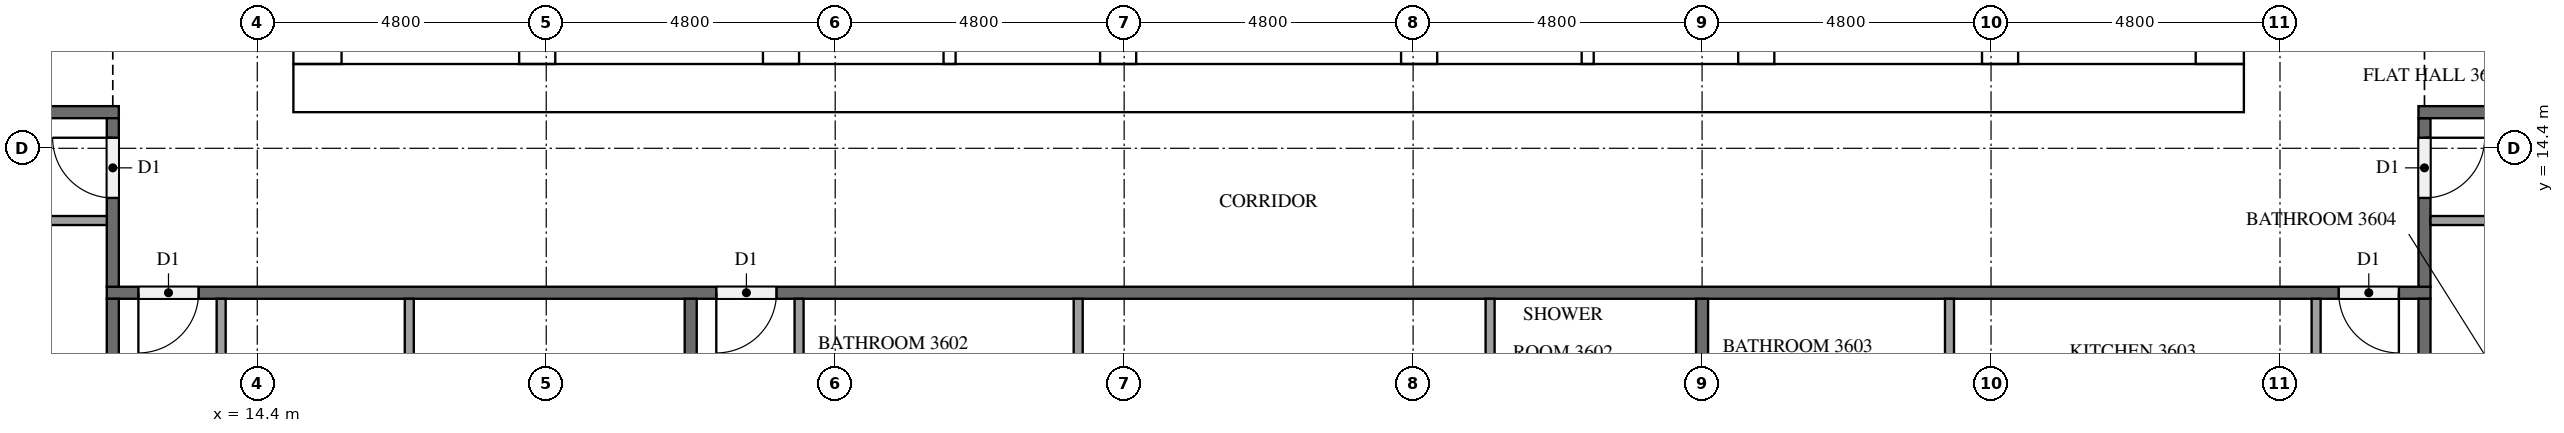
"""IFC4 building model, lengths in metres.
Left out: names, types, materials, properties, quantities, classifications, styles, units other than length and angle.
Written with IfcOpenShell. Run it as: python <this file> out.ifc"""

import sys

from ifc_helpers import new_model, si_unit, direction, frame, frame_2d, origin, place, context, subcontext, project, spatial, rectangle, extrude, element, fill, save


model = new_model("IFC4")
c1 = context("Model", 3, precision=1e-05, world=origin(), true_north=direction((0.0, 1.0)))
c2 = subcontext(c1, "Body", "Model", "MODEL_VIEW")
j1 = project(units=[si_unit("LENGTHUNIT", "METRE"), si_unit("PLANEANGLEUNIT", "RADIAN")], contexts=[c1])
p1 = place(None, origin())
s1 = spatial("IfcSite", under=j1, at=p1, CompositionType="ELEMENT")
p2 = place(p1, origin())
s2 = spatial("IfcBuilding", under=s1, at=p2, CompositionType="ELEMENT")
p3 = place(p2, frame((0.0, 0.0, 140.1)))
s3 = spatial("IfcBuildingStorey", under=s2, at=p3, CompositionType="ELEMENT", Elevation=140.1)
p4 = place(p3, frame((15.0, 15.4, 0.0), z_axis=(0.0, 0.0, 1.0), x_axis=(1.0, 0.0, 0.0)))
e1 = element("IfcWall", 1, at=p4, inside=s3, PredefinedType="SHEAR", context=c2, shape_type="SweptSolid", body=[
    extrude(rectangle(XDim=32.4, YDim=0.8, at=frame_2d((16.2, 0.0))), origin(), (0.0, 0.0, 1.0), 3.1),
])
p5 = place(p4, frame((15.3, 0.0, 0.0)))
e2 = element("IfcOpeningElement", 2, at=p5, cuts=e1, PredefinedType="OPENING", context=c2, shape_type="SweptSolid", body=[
    extrude(rectangle(XDim=1.8, YDim=2.1, at=frame_2d((0.9, 1.05))), frame((0.0, 0.41, 0.0), z_axis=(0.0, -1.0, 0.0), x_axis=(1.0, 0.0, 0.0)), (0.0, 0.0, 1.0), 0.82),
])
p6 = place(p3, frame((15.4, 15.8, 0.0), z_axis=(0.0, 0.0, 1.0), x_axis=(0.0, 1.0, 0.0)))
e3 = element("IfcWall", 3, at=p6, inside=s3, PredefinedType="SHEAR", context=c2, shape_type="SweptSolid", body=[
    extrude(rectangle(XDim=21.2, YDim=0.8, at=frame_2d((10.6, 0.0))), origin(), (0.0, 0.0, 1.0), 3.1),
])
p7 = place(p6, frame((4.96, 0.0, 0.0)))
e4 = element("IfcOpeningElement", 4, at=p7, cuts=e3, PredefinedType="OPENING", context=c2, shape_type="SweptSolid", body=[
    extrude(rectangle(XDim=1.2, YDim=2.1, at=frame_2d((0.6, 1.05))), frame((0.0, 0.41, 0.0), z_axis=(0.0, -1.0, 0.0), x_axis=(1.0, 0.0, 0.0)), (0.0, 0.0, 1.0), 0.82),
])
p8 = place(p3, frame((47.0, 15.8, 0.0), z_axis=(0.0, 0.0, 1.0), x_axis=(0.0, 1.0, 0.0)))
e5 = element("IfcWall", 5, at=p8, inside=s3, PredefinedType="SHEAR", context=c2, shape_type="SweptSolid", body=[
    extrude(rectangle(XDim=21.2, YDim=0.8, at=frame_2d((10.6, 0.0))), origin(), (0.0, 0.0, 1.0), 3.1),
])
p9 = place(p8, frame((10.3, 0.0, 0.0)))
e6 = element("IfcOpeningElement", 6, at=p9, cuts=e5, PredefinedType="OPENING", context=c2, shape_type="SweptSolid", body=[
    extrude(rectangle(XDim=1.2, YDim=2.1, at=frame_2d((0.6, 1.05))), frame((0.0, 0.41, 0.0), z_axis=(0.0, -1.0, 0.0), x_axis=(1.0, 0.0, 0.0)), (0.0, 0.0, 1.0), 0.82),
])
p10 = place(p3, frame((19.05, 15.8, 0.0), z_axis=(0.0, 0.0, 1.0), x_axis=(0.0, 1.0, 0.0)))
e7 = element("IfcWall", 7, at=p10, inside=s3, PredefinedType="SHEAR", context=c2, shape_type="SweptSolid", body=[
    extrude(rectangle(XDim=15.15, YDim=0.6, at=frame_2d((7.575, 0.0))), origin(), (0.0, 0.0, 1.0), 3.1),
])
p11 = place(p10, frame((9.65, 0.0, 0.0)))
e8 = element("IfcOpeningElement", 8, at=p11, cuts=e7, PredefinedType="OPENING", context=c2, shape_type="SweptSolid", body=[
    extrude(rectangle(XDim=1.1, YDim=2.1, at=frame_2d((0.55, 1.05))), frame((0.0, 0.31, 0.0), z_axis=(0.0, -1.0, 0.0), x_axis=(1.0, 0.0, 0.0)), (0.0, 0.0, 1.0), 0.62),
])
p12 = place(p10, frame((13.15, 0.0, 0.0)))
e9 = element("IfcOpeningElement", 9, at=p12, cuts=e7, PredefinedType="OPENING", context=c2, shape_type="SweptSolid", body=[
    extrude(rectangle(XDim=1.1, YDim=2.1, at=frame_2d((0.55, 1.05))), frame((0.0, 0.31, 0.0), z_axis=(0.0, -1.0, 0.0), x_axis=(1.0, 0.0, 0.0)), (0.0, 0.0, 1.0), 0.62),
])
p13 = place(p10, frame((0.4, 0.0, 0.0)))
e10 = element("IfcOpeningElement", 10, at=p13, cuts=e7, PredefinedType="OPENING", context=c2, shape_type="SweptSolid", body=[
    extrude(rectangle(XDim=1.2, YDim=2.1, at=frame_2d((0.6, 1.05))), frame((0.0, 0.31, 0.0), z_axis=(0.0, -1.0, 0.0), x_axis=(1.0, 0.0, 0.0)), (0.0, 0.0, 1.0), 0.62),
])
p14 = place(p3, frame((23.1, 15.8, 0.0), z_axis=(0.0, 0.0, 1.0), x_axis=(0.0, 1.0, 0.0)))
e11 = element("IfcWall", 11, at=p14, inside=s3, PredefinedType="SHEAR", context=c2, shape_type="SweptSolid", body=[
    extrude(rectangle(XDim=21.2, YDim=0.6, at=frame_2d((10.6, 0.0))), origin(), (0.0, 0.0, 1.0), 3.1),
])
p15 = place(p3, frame((39.3, 15.8, 0.0), z_axis=(0.0, 0.0, 1.0), x_axis=(0.0, 1.0, 0.0)))
e12 = element("IfcWall", 12, at=p15, inside=s3, PredefinedType="SHEAR", context=c2, shape_type="SweptSolid", body=[
    extrude(rectangle(XDim=8.45, YDim=0.6, at=frame_2d((4.225, 0.0))), origin(), (0.0, 0.0, 1.0), 3.1),
])
p16 = place(p3, frame((43.35, 15.8, 0.0), z_axis=(0.0, 0.0, 1.0), x_axis=(0.0, 1.0, 0.0)))
e13 = element("IfcWall", 13, at=p16, inside=s3, PredefinedType="SHEAR", context=c2, shape_type="SweptSolid", body=[
    extrude(rectangle(XDim=8.45, YDim=0.6, at=frame_2d((4.225, 0.0))), origin(), (0.0, 0.0, 1.0), 3.1),
])
p17 = place(p16, frame((0.4, 0.0, 0.0)))
e14 = element("IfcOpeningElement", 14, at=p17, cuts=e13, PredefinedType="OPENING", context=c2, shape_type="SweptSolid", body=[
    extrude(rectangle(XDim=1.2, YDim=2.1, at=frame_2d((0.6, 1.05))), frame((0.0, 0.31, 0.0), z_axis=(0.0, -1.0, 0.0), x_axis=(1.0, 0.0, 0.0)), (0.0, 0.0, 1.0), 0.62),
])
for number, where, z_axis, x_axis in (
    (15, (28.7, 15.8, 0.0), (0.0, 0.0, 1.0), (0.0, 1.0, 0.0)),
    (16, (33.7, 15.8, 0.0), (0.0, 0.0, 1.0), (0.0, 1.0, 0.0)),
):
    element("IfcWall", number, at=place(p3, frame(where, z_axis=z_axis, x_axis=x_axis)), inside=s3, PredefinedType="SHEAR", context=c2, shape_type="SweptSolid", body=[
        extrude(rectangle(XDim=2.65, YDim=0.6, at=frame_2d((1.325, 0.0))), origin(), (0.0, 0.0, 1.0), 3.1),
    ])
for number, where, z_axis, x_axis in (
    (17, (25.9, 15.8, 0.0), (0.0, 0.0, 1.0), (0.0, 1.0, 0.0)),
    (18, (36.5, 15.8, 0.0), (0.0, 0.0, 1.0), (0.0, 1.0, 0.0)),
):
    element("IfcWall", number, at=place(p3, frame(where, z_axis=z_axis, x_axis=x_axis)), inside=s3, PredefinedType="SOLIDWALL", context=c2, shape_type="SweptSolid", body=[
        extrude(rectangle(XDim=2.65, YDim=0.2, at=frame_2d((1.325, 0.0))), origin(), (0.0, 0.0, 1.0), 3.1),
    ])
p18 = place(p3, frame((50.5, 12.0, 0.0), z_axis=(0.0, 0.0, 1.0), x_axis=(-1.0, 0.0, 0.0)))
e19 = element("IfcWall", 19, at=p18, inside=s3, PredefinedType="PARTITIONING", context=c2, shape_type="SweptSolid", body=[
    extrude(rectangle(XDim=38.6, YDim=0.2, at=frame_2d((19.3, 0.0))), origin(), (0.0, 0.0, 1.0), 3.1),
])
p19 = place(p18, frame((37.075, 0.0, 0.0)))
e20 = element("IfcOpeningElement", 20, at=p19, cuts=e19, PredefinedType="OPENING", context=c2, shape_type="SweptSolid", body=[
    extrude(rectangle(XDim=1.0, YDim=2.1, at=frame_2d((0.5, 1.05))), frame((0.0, 0.11, 0.0), z_axis=(0.0, -1.0, 0.0), x_axis=(1.0, 0.0, 0.0)), (0.0, 0.0, 1.0), 0.22),
])
p20 = place(p18, frame((27.475, 0.0, 0.0)))
e21 = element("IfcOpeningElement", 21, at=p20, cuts=e19, PredefinedType="OPENING", context=c2, shape_type="SweptSolid", body=[
    extrude(rectangle(XDim=1.0, YDim=2.1, at=frame_2d((0.5, 1.05))), frame((0.0, 0.11, 0.0), z_axis=(0.0, -1.0, 0.0), x_axis=(1.0, 0.0, 0.0)), (0.0, 0.0, 1.0), 0.22),
])
p21 = place(p18, frame((0.525, 0.0, 0.0)))
e22 = element("IfcOpeningElement", 22, at=p21, cuts=e19, PredefinedType="OPENING", context=c2, shape_type="SweptSolid", body=[
    extrude(rectangle(XDim=1.0, YDim=2.1, at=frame_2d((0.5, 1.05))), frame((0.0, 0.11, 0.0), z_axis=(0.0, -1.0, 0.0), x_axis=(1.0, 0.0, 0.0)), (0.0, 0.0, 1.0), 0.22),
])
p22 = place(p3, frame((50.4, 14.9, 0.0), z_axis=(0.0, 0.0, 1.0), x_axis=(0.0, -1.0, 0.0)))
e23 = element("IfcWall", 23, at=p22, inside=s3, PredefinedType="PARTITIONING", context=c2, shape_type="SweptSolid", body=[
    extrude(rectangle(XDim=2.8, YDim=0.2, at=frame_2d((1.4, 0.0))), origin(), (0.0, 0.0, 1.0), 3.1),
])
p23 = place(p22, frame((0.325, 0.0, 0.0)))
e24 = element("IfcOpeningElement", 24, at=p23, cuts=e23, PredefinedType="OPENING", context=c2, shape_type="SweptSolid", body=[
    extrude(rectangle(XDim=1.0, YDim=2.1, at=frame_2d((0.5, 1.05))), frame((0.0, 0.11, 0.0), z_axis=(0.0, -1.0, 0.0), x_axis=(1.0, 0.0, 0.0)), (0.0, 0.0, 1.0), 0.22),
])
p24 = place(p3, frame((50.3, 15.0, 0.0), z_axis=(0.0, 0.0, 1.0), x_axis=(1.0, 0.0, 0.0)))
e25 = element("IfcWall", 25, at=p24, inside=s3, PredefinedType="PARTITIONING", context=c2, shape_type="SweptSolid", body=[
    extrude(rectangle(XDim=2.2, YDim=0.2, at=frame_2d((1.1, 0.0))), origin(), (0.0, 0.0, 1.0), 3.1),
])
p25 = place(p3, frame((9.9, 15.0, 0.0), z_axis=(0.0, 0.0, 1.0), x_axis=(1.0, 0.0, 0.0)))
e26 = element("IfcWall", 26, at=p25, inside=s3, PredefinedType="PARTITIONING", context=c2, shape_type="SweptSolid", body=[
    extrude(rectangle(XDim=2.2, YDim=0.2, at=frame_2d((1.1, 0.0))), origin(), (0.0, 0.0, 1.0), 3.1),
])
p26 = place(p3, frame((12.0, 12.1, 0.0), z_axis=(0.0, 0.0, 1.0), x_axis=(0.0, 1.0, 0.0)))
e27 = element("IfcWall", 27, at=p26, inside=s3, PredefinedType="PARTITIONING", context=c2, shape_type="SweptSolid", body=[
    extrude(rectangle(XDim=2.8, YDim=0.2, at=frame_2d((1.4, 0.0))), origin(), (0.0, 0.0, 1.0), 3.1),
])
p27 = place(p26, frame((1.475, 0.0, 0.0)))
e28 = element("IfcOpeningElement", 28, at=p27, cuts=e27, PredefinedType="OPENING", context=c2, shape_type="SweptSolid", body=[
    extrude(rectangle(XDim=1.0, YDim=2.1, at=frame_2d((0.5, 1.05))), frame((0.0, 0.11, 0.0), z_axis=(0.0, -1.0, 0.0), x_axis=(1.0, 0.0, 0.0)), (0.0, 0.0, 1.0), 0.22),
])
for number, where, z_axis, x_axis in (
    (29, (21.6, 11.9, 0.0), (0.0, 0.0, 1.0), (0.0, -1.0, 0.0)),
    (30, (12.0, 4.9, 0.0), (0.0, 0.0, 1.0), (0.0, 1.0, 0.0)),
    (31, (38.4, 11.9, 0.0), (0.0, 0.0, 1.0), (0.0, -1.0, 0.0)),
    (32, (50.4, 11.9, 0.0), (0.0, 0.0, 1.0), (0.0, -1.0, 0.0)),
):
    element("IfcWall", number, at=place(p3, frame(where, z_axis=z_axis, x_axis=x_axis)), inside=s3, PredefinedType="PARTITIONING", context=c2, shape_type="SweptSolid", body=[
        extrude(rectangle(XDim=7.0, YDim=0.2, at=frame_2d((3.5, 0.0))), origin(), (0.0, 0.0, 1.0), 3.1),
    ])
p28 = place(p3, frame((16.925, 11.9, 0.0), z_axis=(0.0, 0.0, 1.0), x_axis=(0.0, -1.0, 0.0)))
e33 = element("IfcWall", 33, at=p28, inside=s3, PredefinedType="PARTITIONING", context=c2, shape_type="SweptSolid", body=[
    extrude(rectangle(XDim=2.075, YDim=0.15, at=frame_2d((1.038, 0.0))), origin(), (0.0, 0.0, 1.0), 3.1),
])
p29 = place(p3, frame((13.8, 11.9, 0.0), z_axis=(0.0, 0.0, 1.0), x_axis=(0.0, -1.0, 0.0)))
e34 = element("IfcWall", 34, at=p29, inside=s3, PredefinedType="PARTITIONING", context=c2, shape_type="SweptSolid", body=[
    extrude(rectangle(XDim=2.225, YDim=0.15, at=frame_2d((1.112, 0.0))), origin(), (0.0, 0.0, 1.0), 3.1),
])
for number, where, z_axis, x_axis in (
    (35, (28.037, 11.9, 0.0), (0.0, 0.0, 1.0), (0.0, -1.0, 0.0)),
    (36, (34.879, 11.9, 0.0), (0.0, 0.0, 1.0), (0.0, -1.0, 0.0)),
):
    element("IfcWall", number, at=place(p3, frame(where, z_axis=z_axis, x_axis=x_axis)), inside=s3, PredefinedType="PARTITIONING", context=c2, shape_type="SweptSolid", body=[
        extrude(rectangle(XDim=2.075, YDim=0.15, at=frame_2d((1.038, 0.0))), origin(), (0.0, 0.0, 1.0), 3.1),
    ])
p30 = place(p3, frame((23.4, 11.9, 0.0), z_axis=(0.0, 0.0, 1.0), x_axis=(0.0, -1.0, 0.0)))
e37 = element("IfcWall", 37, at=p30, inside=s3, PredefinedType="PARTITIONING", context=c2, shape_type="SweptSolid", body=[
    extrude(rectangle(XDim=2.225, YDim=0.15, at=frame_2d((1.112, 0.0))), origin(), (0.0, 0.0, 1.0), 3.1),
])
p31 = place(p3, frame((42.51, 11.9, 0.0), z_axis=(0.0, 0.0, 1.0), x_axis=(0.0, -1.0, 0.0)))
e38 = element("IfcWall", 38, at=p31, inside=s3, PredefinedType="PARTITIONING", context=c2, shape_type="SweptSolid", body=[
    extrude(rectangle(XDim=1.775, YDim=0.15, at=frame_2d((0.887, 0.0))), origin(), (0.0, 0.0, 1.0), 3.1),
])
p32 = place(p3, frame((48.6, 11.9, 0.0), z_axis=(0.0, 0.0, 1.0), x_axis=(0.0, -1.0, 0.0)))
e39 = element("IfcWall", 39, at=p32, inside=s3, PredefinedType="PARTITIONING", context=c2, shape_type="SweptSolid", body=[
    extrude(rectangle(XDim=1.925, YDim=0.15, at=frame_2d((0.962, 0.0))), origin(), (0.0, 0.0, 1.0), 3.1),
])
p33 = place(p3, frame((50.5, 13.2, 0.0), z_axis=(0.0, 0.0, 1.0), x_axis=(1.0, 0.0, 0.0)))
e40 = element("IfcWall", 40, at=p33, inside=s3, PredefinedType="PARTITIONING", context=c2, shape_type="SweptSolid", body=[
    extrude(rectangle(XDim=2.075, YDim=0.15, at=frame_2d((1.038, 0.0))), origin(), (0.0, 0.0, 1.0), 3.1),
])
p34 = place(p3, frame((11.9, 13.2, 0.0), z_axis=(0.0, 0.0, 1.0), x_axis=(-1.0, 0.0, 0.0)))
e41 = element("IfcWall", 41, at=p34, inside=s3, PredefinedType="PARTITIONING", context=c2, shape_type="SweptSolid", body=[
    extrude(rectangle(XDim=3.425, YDim=0.15, at=frame_2d((1.712, 0.0))), origin(), (0.0, 0.0, 1.0), 3.1),
])
p35 = place(p5, frame((1.8, 0.0, 0.0), z_axis=(0.0, 0.0, 1.0), x_axis=(-1.0, 0.0, 0.0)))
e42 = element("IfcDoor", 42, at=p35, inside=s3, OperationType="DOUBLE_DOOR_SINGLE_SWING", PredefinedType="DOOR", context=c2, shape_type="SweptSolid", body=[
    extrude(rectangle(XDim=1.8, YDim=2.1, at=frame_2d((0.9, 1.05))), frame((0.0, 0.025, 0.0), z_axis=(0.0, -1.0, 0.0), x_axis=(1.0, 0.0, 0.0)), (0.0, 0.0, 1.0), 0.05),
])
fill(e2, e42)
p36 = place(p19, origin())
e43 = element("IfcDoor", 43, at=p36, inside=s3, OperationType="SINGLE_SWING_RIGHT", PredefinedType="DOOR", context=c2, shape_type="SweptSolid", body=[
    extrude(rectangle(XDim=1.0, YDim=2.1, at=frame_2d((0.5, 1.05))), frame((0.0, 0.025, 0.0), z_axis=(0.0, -1.0, 0.0), x_axis=(1.0, 0.0, 0.0)), (0.0, 0.0, 1.0), 0.05),
])
fill(e20, e43)
p37 = place(p20, origin())
e44 = element("IfcDoor", 44, at=p37, inside=s3, OperationType="SINGLE_SWING_RIGHT", PredefinedType="DOOR", context=c2, shape_type="SweptSolid", body=[
    extrude(rectangle(XDim=1.0, YDim=2.1, at=frame_2d((0.5, 1.05))), frame((0.0, 0.025, 0.0), z_axis=(0.0, -1.0, 0.0), x_axis=(1.0, 0.0, 0.0)), (0.0, 0.0, 1.0), 0.05),
])
fill(e21, e44)
p38 = place(p21, origin())
e45 = element("IfcDoor", 45, at=p38, inside=s3, OperationType="SINGLE_SWING_LEFT", PredefinedType="DOOR", context=c2, shape_type="SweptSolid", body=[
    extrude(rectangle(XDim=1.0, YDim=2.1, at=frame_2d((0.5, 1.05))), frame((0.0, 0.025, 0.0), z_axis=(0.0, -1.0, 0.0), x_axis=(1.0, 0.0, 0.0)), (0.0, 0.0, 1.0), 0.05),
])
fill(e22, e45)
p39 = place(p23, origin())
e46 = element("IfcDoor", 46, at=p39, inside=s3, OperationType="SINGLE_SWING_LEFT", PredefinedType="DOOR", context=c2, shape_type="SweptSolid", body=[
    extrude(rectangle(XDim=1.0, YDim=2.1, at=frame_2d((0.5, 1.05))), frame((0.0, 0.025, 0.0), z_axis=(0.0, -1.0, 0.0), x_axis=(1.0, 0.0, 0.0)), (0.0, 0.0, 1.0), 0.05),
])
fill(e24, e46)
p40 = place(p27, origin())
e47 = element("IfcDoor", 47, at=p40, inside=s3, OperationType="SINGLE_SWING_RIGHT", PredefinedType="DOOR", context=c2, shape_type="SweptSolid", body=[
    extrude(rectangle(XDim=1.0, YDim=2.1, at=frame_2d((0.5, 1.05))), frame((0.0, 0.025, 0.0), z_axis=(0.0, -1.0, 0.0), x_axis=(1.0, 0.0, 0.0)), (0.0, 0.0, 1.0), 0.05),
])
fill(e28, e47)
save(model, sys.argv[1])
